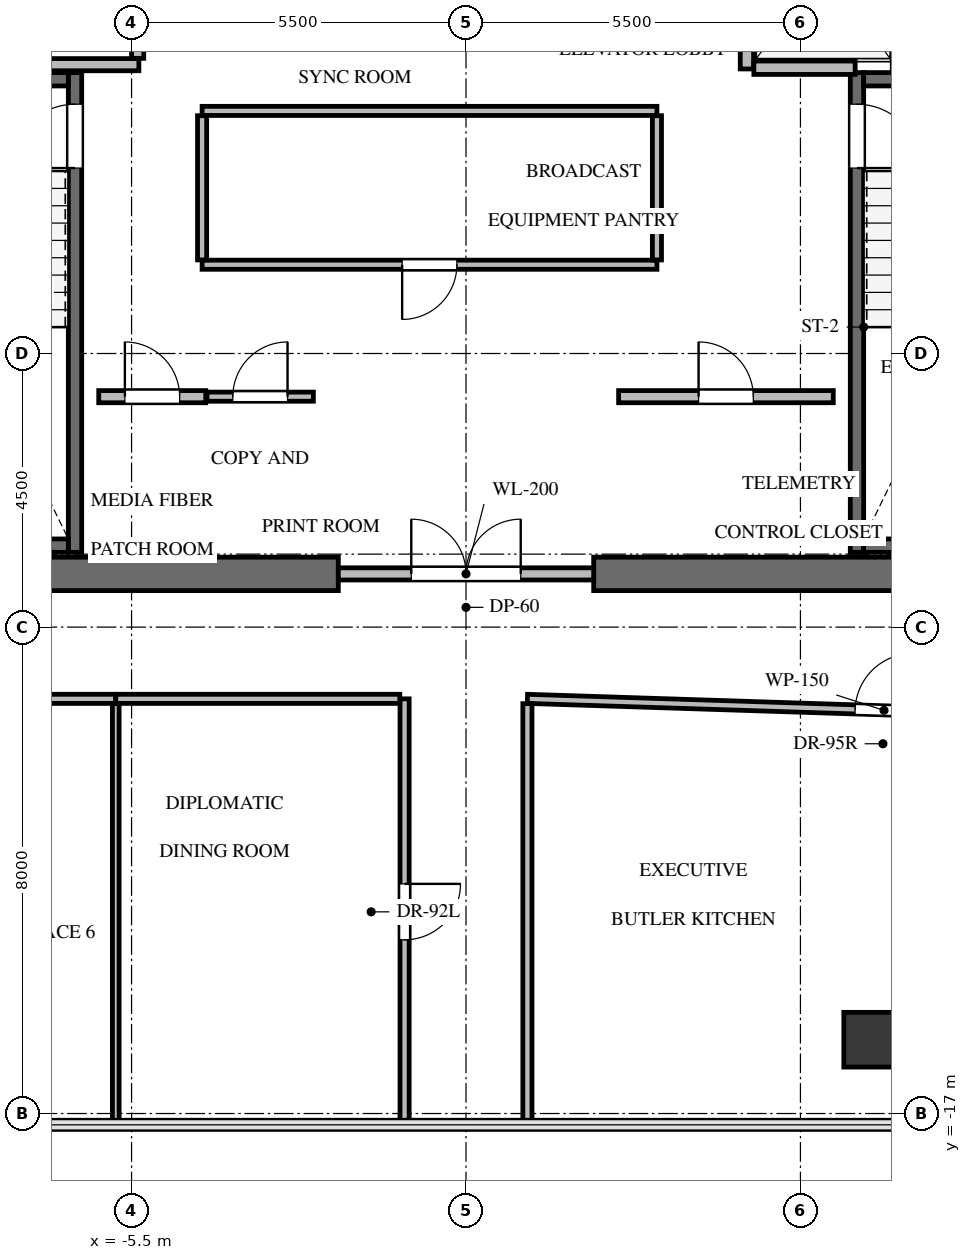
"""IFC4 building model, lengths in metres.
Left out: names, types, materials, properties, quantities, classifications, styles, units other than length and angle.
Written with IfcOpenShell. Run it as: python <this file> out.ifc"""

import sys

from ifc_helpers import new_model, si_unit, direction, frame, frame_2d, origin, origin_2d, place, context, subcontext, project, spatial, rectangle, extrude, source, transform, mapped, element, fill, save


model = new_model("IFC4")
c1 = context("Model", 3, precision=1e-05, world=origin(), true_north=direction((0.0, 1.0)))
c2 = subcontext(c1, "Body", "Model", "MODEL_VIEW")
j1 = project(units=[si_unit("LENGTHUNIT", "METRE"), si_unit("PLANEANGLEUNIT", "RADIAN")], contexts=[c1])
p1 = place(None, origin())
s1 = spatial("IfcSite", under=j1, at=p1, CompositionType="ELEMENT")
p2 = place(p1, origin())
s2 = spatial("IfcBuilding", under=s1, at=p2, CompositionType="ELEMENT")
p3 = place(p2, frame((0.0, 0.0, 261.5)))
s3 = spatial("IfcBuildingStorey", under=s2, at=p3, CompositionType="ELEMENT", Elevation=261.5)
for number, where, z_axis, x_axis in (
    (1, (-9.85, -8.125, 0.0), (0.0, 0.0, 1.0), (1.0, 0.0, 0.0)),
    (2, (2.1, -8.125, 0.0), (0.0, 0.0, 1.0), (1.0, 0.0, 0.0)),
):
    element("IfcWall", number, at=place(p3, frame(where, z_axis=z_axis, x_axis=x_axis)), inside=s3, PredefinedType="SHEAR", context=c2, shape_type="SweptSolid", body=[
        extrude(rectangle(XDim=7.75, YDim=0.55, at=frame_2d((3.875, 0.0))), origin(), (0.0, 0.0, 1.0), 3.4),
    ])
p4 = place(p3, frame((-6.43, -7.77, -0.24), z_axis=(0.0, 0.0, 1.0), x_axis=(0.0, 1.0, 0.0)))
e3 = element("IfcWall", 3, at=p4, inside=s3, PredefinedType="SHEAR", context=c2, shape_type="SweptSolid", body=[
    extrude(rectangle(XDim=7.89, YDim=0.22, at=frame_2d((3.945, 0.0))), origin(), (0.0, 0.0, 1.0), 3.34),
])
p5 = place(p4, frame((6.32, 0.0, 0.0)))
e4 = element("IfcOpeningElement", 4, at=p5, cuts=e3, PredefinedType="OPENING", context=c2, shape_type="SweptSolid", body=[
    extrude(rectangle(XDim=1.05, YDim=2.15, at=frame_2d((0.525, 1.075))), frame((0.0, 0.12, 0.0), z_axis=(0.0, -1.0, 0.0), x_axis=(1.0, 0.0, 0.0)), (0.0, 0.0, 1.0), 0.24),
])
for number, where, z_axis, x_axis in (
    (5, (-9.5, -7.66, -0.24), (0.0, 0.0, 1.0), (1.0, 0.0, 0.0)),
    (6, (-6.54, 0.01, -0.24), (0.0, 0.0, 1.0), (-1.0, 0.0, 0.0)),
):
    element("IfcWall", number, at=place(p3, frame(where, z_axis=z_axis, x_axis=x_axis)), inside=s3, PredefinedType="SHEAR", context=c2, shape_type="SweptSolid", body=[
        extrude(rectangle(XDim=2.96, YDim=0.22, at=frame_2d((1.48, 0.0))), origin(), (0.0, 0.0, 1.0), 3.34),
    ])
p6 = place(p3, frame((6.43, 0.12, -0.24), z_axis=(0.0, 0.0, 1.0), x_axis=(0.0, -1.0, 0.0)))
e7 = element("IfcWall", 7, at=p6, inside=s3, PredefinedType="SHEAR", context=c2, shape_type="SweptSolid", body=[
    extrude(rectangle(XDim=7.89, YDim=0.22, at=frame_2d((3.945, 0.0))), origin(), (0.0, 0.0, 1.0), 3.34),
])
p7 = place(p6, frame((0.52, 0.0, 0.0)))
e8 = element("IfcOpeningElement", 8, at=p7, cuts=e7, PredefinedType="OPENING", context=c2, shape_type="SweptSolid", body=[
    extrude(rectangle(XDim=1.05, YDim=2.15, at=frame_2d((0.525, 1.075))), frame((0.0, 0.12, 0.0), z_axis=(0.0, -1.0, 0.0), x_axis=(1.0, 0.0, 0.0)), (0.0, 0.0, 1.0), 0.24),
])
for number, where, z_axis, x_axis in (
    (9, (6.54, -7.66, -0.24), (0.0, 0.0, 1.0), (1.0, 0.0, 0.0)),
    (10, (9.5, 0.01, -0.24), (0.0, 0.0, 1.0), (-1.0, 0.0, 0.0)),
):
    element("IfcWall", number, at=place(p3, frame(where, z_axis=z_axis, x_axis=x_axis)), inside=s3, PredefinedType="SHEAR", context=c2, shape_type="SweptSolid", body=[
        extrude(rectangle(XDim=2.96, YDim=0.22, at=frame_2d((1.48, 0.0))), origin(), (0.0, 0.0, 1.0), 3.34),
    ])
m1 = source(origin(), c2, "Body", "SweptSolid", [
    extrude(rectangle(XDim=0.9, YDim=0.9, at=origin_2d()), origin(), (0.0, 0.0, 1.0), 3.34),
])
p8 = place(p3, frame((6.664, -15.786, -0.24), z_axis=(0.0, 0.0, 1.0), x_axis=(1.0, 0.0, 0.0)))
e11 = element("IfcColumn", 11, at=p8, inside=s3, PredefinedType="COLUMN", context=c2, shape_type="MappedRepresentation", body=[
    mapped(m1, transform((0.0, 0.0, 0.0), x_axis=(1.0, 0.0, 0.0), y_axis=(0.0, 1.0, 0.0), z_axis=(0.0, 0.0, 1.0), scale=1.0)),
])
p9 = place(p3, frame((-2.1, -8.125, 0.0), z_axis=(0.0, 0.0, 1.0), x_axis=(1.0, 0.0, 0.0)))
e12 = element("IfcWall", 12, at=p9, inside=s3, PredefinedType="SOLIDWALL", context=c2, shape_type="SweptSolid", body=[
    extrude(rectangle(XDim=4.2, YDim=0.2, at=frame_2d((2.1, 0.0))), origin(), (0.0, 0.0, 1.0), 3.085),
])
p10 = place(p9, frame((1.2, 0.0, 0.0)))
e13 = element("IfcOpeningElement", 13, at=p10, cuts=e12, PredefinedType="OPENING", context=c2, shape_type="SweptSolid", body=[
    extrude(rectangle(XDim=1.8, YDim=2.15, at=frame_2d((0.9, 1.075))), frame((0.0, 0.11, 0.0), z_axis=(0.0, -1.0, 0.0), x_axis=(1.0, 0.0, 0.0)), (0.0, 0.0, 1.0), 0.22),
])
p11 = place(p3, frame((-9.65, 0.25, 0.0), z_axis=(0.0, 0.0, 1.0), x_axis=(1.0, 0.0, 0.0)))
e14 = element("IfcWall", 14, at=p11, inside=s3, PredefinedType="SOLIDWALL", context=c2, shape_type="SweptSolid", body=[
    extrude(rectangle(XDim=4.27, YDim=0.2, at=frame_2d((2.135, 0.0))), origin(), (0.0, 0.0, 1.0), 3.085),
])
p12 = place(p3, frame((-5.4, 0.354, 0.0), z_axis=(0.0, 0.0, 1.0), x_axis=(0.0, 1.0, 0.0)))
e15 = element("IfcWall", 15, at=p12, inside=s3, PredefinedType="SOLIDWALL", context=c2, shape_type="SweptSolid", body=[
    extrude(rectangle(XDim=4.026, YDim=0.2, at=frame_2d((2.013, 0.0))), origin(), (0.0, 0.0, 1.0), 3.085),
])
p13 = place(p12, frame((0.246, 0.0, 0.0)))
e16 = element("IfcOpeningElement", 16, at=p13, cuts=e15, PredefinedType="OPENING", context=c2, shape_type="SweptSolid", body=[
    extrude(rectangle(XDim=1.0, YDim=2.15, at=frame_2d((0.5, 1.075))), frame((0.0, 0.11, 0.0), z_axis=(0.0, -1.0, 0.0), x_axis=(1.0, 0.0, 0.0)), (0.0, 0.0, 1.0), 0.22),
])
p14 = place(p3, frame((4.62, 0.18, 0.0), z_axis=(0.0, 0.0, 1.0), x_axis=(0.0, 1.0, 0.0)))
e17 = element("IfcWall", 17, at=p14, inside=s3, PredefinedType="SOLIDWALL", context=c2, shape_type="SweptSolid", body=[
    extrude(rectangle(XDim=3.186, YDim=0.22, at=frame_2d((1.593, 0.0))), origin(), (0.0, 0.0, 1.0), 3.085),
])
p15 = place(p3, frame((4.734, 0.2, 0.0), z_axis=(0.0, 0.0, 1.0), x_axis=(1.0, 0.0, 0.0)))
e18 = element("IfcWall", 18, at=p15, inside=s3, PredefinedType="SOLIDWALL", context=c2, shape_type="SweptSolid", body=[
    extrude(rectangle(XDim=1.666, YDim=0.22, at=frame_2d((0.833, 0.0))), origin(), (0.0, 0.0, 1.0), 3.085),
])
p16 = place(p3, frame((-6.04, -5.21, 0.0), z_axis=(0.0, 0.0, 1.0), x_axis=(1.0, 0.0, 0.0)))
e19 = element("IfcWall", 19, at=p16, inside=s3, PredefinedType="SOLIDWALL", context=c2, shape_type="SweptSolid", body=[
    extrude(rectangle(XDim=1.76, YDim=0.2, at=frame_2d((0.88, 0.0))), origin(), (0.0, 0.0, 1.0), 3.085),
])
p17 = place(p16, frame((0.43, 0.0, 0.0)))
e20 = element("IfcOpeningElement", 20, at=p17, cuts=e19, PredefinedType="OPENING", context=c2, shape_type="SweptSolid", body=[
    extrude(rectangle(XDim=0.9, YDim=2.05, at=frame_2d((0.45, 1.025))), frame((0.0, 0.11, 0.0), z_axis=(0.0, -1.0, 0.0), x_axis=(1.0, 0.0, 0.0)), (0.0, 0.0, 1.0), 0.22),
])
p18 = place(p3, frame((-4.26, -5.21, 0.0), z_axis=(0.0, 0.0, 1.0), x_axis=(1.0, 0.0, 0.0)))
e21 = element("IfcWall", 21, at=p18, inside=s3, PredefinedType="PARTITIONING", context=c2, shape_type="SweptSolid", body=[
    extrude(rectangle(XDim=1.75, YDim=0.15, at=frame_2d((0.875, 0.0))), origin(), (0.0, 0.0, 1.0), 3.085),
])
p19 = place(p18, frame((0.425, 0.0, 0.0)))
e22 = element("IfcOpeningElement", 22, at=p19, cuts=e21, PredefinedType="OPENING", context=c2, shape_type="SweptSolid", body=[
    extrude(rectangle(XDim=0.9, YDim=2.05, at=frame_2d((0.45, 1.025))), frame((0.0, 0.085, 0.0), z_axis=(0.0, -1.0, 0.0), x_axis=(1.0, 0.0, 0.0)), (0.0, 0.0, 1.0), 0.17),
])
p20 = place(p3, frame((2.51, -5.21, 0.0), z_axis=(0.0, 0.0, 1.0), x_axis=(1.0, 0.0, 0.0)))
e23 = element("IfcWall", 23, at=p20, inside=s3, PredefinedType="SOLIDWALL", context=c2, shape_type="SweptSolid", body=[
    extrude(rectangle(XDim=3.53, YDim=0.2, at=frame_2d((1.765, 0.0))), origin(), (0.0, 0.0, 1.0), 3.085),
])
p21 = place(p20, frame((1.315, 0.0, 0.0)))
e24 = element("IfcOpeningElement", 24, at=p21, cuts=e23, PredefinedType="OPENING", context=c2, shape_type="SweptSolid", body=[
    extrude(rectangle(XDim=0.9, YDim=2.05, at=frame_2d((0.45, 1.025))), frame((0.0, 0.11, 0.0), z_axis=(0.0, -1.0, 0.0), x_axis=(1.0, 0.0, 0.0)), (0.0, 0.0, 1.0), 0.22),
])
p22 = place(p3, frame((3.14, -3.04, 0.0), z_axis=(0.0, 0.0, 1.0), x_axis=(-1.0, 0.0, 0.0)))
e25 = element("IfcWall", 25, at=p22, inside=s3, PredefinedType="PARTITIONING", context=c2, shape_type="SweptSolid", body=[
    extrude(rectangle(XDim=7.48, YDim=0.15, at=frame_2d((3.74, 0.0))), origin(), (0.0, 0.0, 1.0), 3.085),
])
p23 = place(p22, frame((3.29, 0.0, 0.0)))
e26 = element("IfcOpeningElement", 26, at=p23, cuts=e25, PredefinedType="OPENING", context=c2, shape_type="SweptSolid", body=[
    extrude(rectangle(XDim=0.9, YDim=2.05, at=frame_2d((0.45, 1.025))), frame((0.0, 0.085, 0.0), z_axis=(0.0, -1.0, 0.0), x_axis=(1.0, 0.0, 0.0)), (0.0, 0.0, 1.0), 0.17),
])
p24 = place(p3, frame((-4.34, -0.51, 0.0), z_axis=(0.0, 0.0, 1.0), x_axis=(1.0, 0.0, 0.0)))
e27 = element("IfcWall", 27, at=p24, inside=s3, PredefinedType="PARTITIONING", context=c2, shape_type="SweptSolid", body=[
    extrude(rectangle(XDim=7.48, YDim=0.15, at=frame_2d((3.74, 0.0))), origin(), (0.0, 0.0, 1.0), 3.085),
])
for number, where, z_axis, x_axis in (
    (28, (-4.34, -2.961, 0.0), (0.0, 0.0, 1.0), (0.0, 1.0, 0.0)),
    (29, (3.14, -0.589, 0.0), (0.0, 0.0, 1.0), (0.0, -1.0, 0.0)),
):
    element("IfcWall", number, at=place(p3, frame(where, z_axis=z_axis, x_axis=x_axis)), inside=s3, PredefinedType="PARTITIONING", context=c2, shape_type="SweptSolid", body=[
        extrude(rectangle(XDim=2.372, YDim=0.15, at=frame_2d((1.186, 0.0))), origin(), (0.0, 0.0, 1.0), 3.085),
    ])
p25 = place(p3, frame((-12.39, -10.18, 0.0), z_axis=(0.0, 0.0, 1.0), x_axis=(1.0, 0.0, 0.0)))
e30 = element("IfcWall", 30, at=p25, inside=s3, PredefinedType="PARTITIONING", context=c2, shape_type="SweptSolid", body=[
    extrude(rectangle(XDim=6.63, YDim=0.15, at=frame_2d((3.315, 0.0))), origin(), (0.0, 0.0, 1.0), 3.085),
])
p26 = place(p25, frame((2.84, 0.0, 0.0)))
e31 = element("IfcOpeningElement", 31, at=p26, cuts=e30, PredefinedType="OPENING", context=c2, shape_type="SweptSolid", body=[
    extrude(rectangle(XDim=0.95, YDim=2.1, at=frame_2d((0.475, 1.05))), frame((0.0, 0.085, 0.0), z_axis=(0.0, -1.0, 0.0), x_axis=(1.0, 0.0, 0.0)), (0.0, 0.0, 1.0), 0.17),
])
p27 = place(p3, frame((-1.01, -10.18, 0.0), z_axis=(0.0, 0.0, 1.0), x_axis=(0.0, -1.0, 0.0)))
e32 = element("IfcWall", 32, at=p27, inside=s3, PredefinedType="PARTITIONING", context=c2, shape_type="SweptSolid", body=[
    extrude(rectangle(XDim=7.006, YDim=0.15, at=frame_2d((3.503, 0.0))), origin(), (0.0, 0.0, 1.0), 2.439),
])
p28 = place(p27, frame((3.043, 0.0, 0.0)))
e33 = element("IfcOpeningElement", 33, at=p28, cuts=e32, PredefinedType="OPENING", context=c2, shape_type="SweptSolid", body=[
    extrude(rectangle(XDim=0.92, YDim=2.1, at=frame_2d((0.46, 1.05))), frame((0.0, 0.085, 0.0), z_axis=(0.0, -1.0, 0.0), x_axis=(1.0, 0.0, 0.0)), (0.0, 0.0, 1.0), 0.17),
])
p29 = place(p3, frame((-5.76, -10.18, 0.0), z_axis=(0.0, 0.0, 1.0), x_axis=(1.0, 0.0, 0.0)))
e34 = element("IfcWall", 34, at=p29, inside=s3, PredefinedType="PARTITIONING", context=c2, shape_type="SweptSolid", body=[
    extrude(rectangle(XDim=4.671, YDim=0.15, at=frame_2d((2.335, 0.0))), origin(), (0.0, 0.0, 1.0), 2.341),
])
p30 = place(p3, frame((1.01, -10.18, 0.0), z_axis=(0.0, 0.0, 1.0), x_axis=(0.999481281494, -0.032205091873, 0.0)))
e35 = element("IfcWall", 35, at=p30, inside=s3, PredefinedType="PARTITIONING", context=c2, shape_type="SweptSolid", body=[
    extrude(rectangle(XDim=11.735, YDim=0.15, at=frame_2d((5.868, 0.0))), origin(), (0.0, 0.0, 1.0), 2.341),
])
p31 = place(p30, frame((5.393, 0.0, 0.0)))
e36 = element("IfcOpeningElement", 36, at=p31, cuts=e35, PredefinedType="OPENING", context=c2, shape_type="SweptSolid", body=[
    extrude(rectangle(XDim=0.95, YDim=2.1, at=frame_2d((0.475, 1.05))), frame((0.0, 0.085, 0.0), z_axis=(0.0, -1.0, 0.0), x_axis=(1.0, 0.0, 0.0)), (0.0, 0.0, 1.0), 0.17),
])
p32 = place(p3, frame((1.01, -17.186, 0.0), z_axis=(0.0, 0.0, 1.0), x_axis=(0.0, 1.0, 0.0)))
e37 = element("IfcWall", 37, at=p32, inside=s3, PredefinedType="PARTITIONING", context=c2, shape_type="SweptSolid", body=[
    extrude(rectangle(XDim=6.927, YDim=0.15, at=frame_2d((3.463, 0.0))), origin(), (0.0, 0.0, 1.0), 2.439),
])
p33 = place(p3, frame((-5.76, -10.259, 0.0), z_axis=(0.0, 0.0, 1.0), x_axis=(0.0, -1.0, 0.0)))
e38 = element("IfcWall", 38, at=p33, inside=s3, PredefinedType="MOVABLE", context=c2, shape_type="SweptSolid", body=[
    extrude(rectangle(XDim=6.927, YDim=0.11, at=frame_2d((3.463, 0.0))), origin(), (0.0, 0.0, 1.0), 2.341),
])
m2 = source(origin(), c2, "Body", "SweptSolid", [
    extrude(rectangle(XDim=1.05, YDim=2.15, at=frame_2d((0.525, 1.075))), frame((0.0, 0.025, 0.0), z_axis=(0.0, -1.0, 0.0), x_axis=(1.0, 0.0, 0.0)), (0.0, 0.0, 1.0), 0.05),
])
p34 = place(p5, origin())
e39 = element("IfcDoor", 39, at=p34, inside=s3, OperationType="SINGLE_SWING_LEFT", PredefinedType="DOOR", context=c2, shape_type="MappedRepresentation", body=[
    mapped(m2, transform((0.0, 0.0, 0.0), x_axis=(1.0, 0.0, 0.0), y_axis=(0.0, 1.0, 0.0), z_axis=(0.0, 0.0, 1.0), scale=1.0)),
])
fill(e4, e39)
m3 = source(origin(), c2, "Body", "SweptSolid", [
    extrude(rectangle(XDim=1.05, YDim=2.15, at=frame_2d((0.525, 1.075))), frame((0.0, 0.025, 0.0), z_axis=(0.0, -1.0, 0.0), x_axis=(1.0, 0.0, 0.0)), (0.0, 0.0, 1.0), 0.05),
])
p35 = place(p7, origin())
e40 = element("IfcDoor", 40, at=p35, inside=s3, OperationType="SINGLE_SWING_RIGHT", PredefinedType="DOOR", context=c2, shape_type="MappedRepresentation", body=[
    mapped(m3, transform((0.0, 0.0, 0.0), x_axis=(1.0, 0.0, 0.0), y_axis=(0.0, 1.0, 0.0), z_axis=(0.0, 0.0, 1.0), scale=1.0)),
])
fill(e8, e40)
m4 = source(origin(), c2, "Body", "SweptSolid", [
    extrude(rectangle(XDim=1.8, YDim=2.15, at=frame_2d((0.9, 1.075))), frame((0.0, 0.025, 0.0), z_axis=(0.0, -1.0, 0.0), x_axis=(1.0, 0.0, 0.0)), (0.0, 0.0, 1.0), 0.05),
])
p36 = place(p10, origin())
e41 = element("IfcDoor", 41, at=p36, inside=s3, OperationType="DOUBLE_DOOR_SINGLE_SWING", PredefinedType="DOOR", context=c2, shape_type="MappedRepresentation", body=[
    mapped(m4, transform((0.0, 0.0, 0.0), x_axis=(1.0, 0.0, 0.0), y_axis=(0.0, 1.0, 0.0), z_axis=(0.0, 0.0, 1.0), scale=1.0)),
])
fill(e13, e41)
m5 = source(origin(), c2, "Body", "SweptSolid", [
    extrude(rectangle(XDim=0.9, YDim=2.05, at=frame_2d((0.45, 1.025))), frame((0.0, 0.025, 0.0), z_axis=(0.0, -1.0, 0.0), x_axis=(1.0, 0.0, 0.0)), (0.0, 0.0, 1.0), 0.05),
])
p37 = place(p17, origin())
e42 = element("IfcDoor", 42, at=p37, inside=s3, OperationType="SINGLE_SWING_LEFT", PredefinedType="DOOR", context=c2, shape_type="MappedRepresentation", body=[
    mapped(m5, transform((0.0, 0.0, 0.0), x_axis=(1.0, 0.0, 0.0), y_axis=(0.0, 1.0, 0.0), z_axis=(0.0, 0.0, 1.0), scale=1.0)),
])
fill(e20, e42)
m6 = source(origin(), c2, "Body", "SweptSolid", [
    extrude(rectangle(XDim=0.9, YDim=2.05, at=frame_2d((0.45, 1.025))), frame((0.0, 0.025, 0.0), z_axis=(0.0, -1.0, 0.0), x_axis=(1.0, 0.0, 0.0)), (0.0, 0.0, 1.0), 0.05),
])
p38 = place(p19, origin())
e43 = element("IfcDoor", 43, at=p38, inside=s3, OperationType="SINGLE_SWING_RIGHT", PredefinedType="DOOR", context=c2, shape_type="MappedRepresentation", body=[
    mapped(m6, transform((0.0, 0.0, 0.0), x_axis=(1.0, 0.0, 0.0), y_axis=(0.0, 1.0, 0.0), z_axis=(0.0, 0.0, 1.0), scale=1.0)),
])
fill(e22, e43)
p39 = place(p21, origin())
e44 = element("IfcDoor", 44, at=p39, inside=s3, OperationType="SINGLE_SWING_LEFT", PredefinedType="DOOR", context=c2, shape_type="MappedRepresentation", body=[
    mapped(m5, transform((0.0, 0.0, 0.0), x_axis=(1.0, 0.0, 0.0), y_axis=(0.0, 1.0, 0.0), z_axis=(0.0, 0.0, 1.0), scale=1.0)),
])
fill(e24, e44)
p40 = place(p23, origin())
e45 = element("IfcDoor", 45, at=p40, inside=s3, OperationType="SINGLE_SWING_RIGHT", PredefinedType="DOOR", context=c2, shape_type="MappedRepresentation", body=[
    mapped(m6, transform((0.0, 0.0, 0.0), x_axis=(1.0, 0.0, 0.0), y_axis=(0.0, 1.0, 0.0), z_axis=(0.0, 0.0, 1.0), scale=1.0)),
])
fill(e26, e45)
m7 = source(origin(), c2, "Body", "SweptSolid", [
    extrude(rectangle(XDim=0.92, YDim=2.1, at=frame_2d((0.46, 1.05))), frame((0.0, 0.025, 0.0), z_axis=(0.0, -1.0, 0.0), x_axis=(1.0, 0.0, 0.0)), (0.0, 0.0, 1.0), 0.05),
])
p41 = place(p28, origin())
e46 = element("IfcDoor", 46, at=p41, inside=s3, OperationType="SINGLE_SWING_LEFT", PredefinedType="DOOR", context=c2, shape_type="MappedRepresentation", body=[
    mapped(m7, transform((0.0, 0.0, 0.0), x_axis=(1.0, 0.0, 0.0), y_axis=(0.0, 1.0, 0.0), z_axis=(0.0, 0.0, 1.0), scale=1.0)),
])
fill(e33, e46)
m8 = source(origin(), c2, "Body", "SweptSolid", [
    extrude(rectangle(XDim=0.95, YDim=2.1, at=frame_2d((0.475, 1.05))), frame((0.0, 0.025, 0.0), z_axis=(0.0, -1.0, 0.0), x_axis=(1.0, 0.0, 0.0)), (0.0, 0.0, 1.0), 0.05),
])
p42 = place(p31, origin())
e47 = element("IfcDoor", 47, at=p42, inside=s3, OperationType="SINGLE_SWING_RIGHT", PredefinedType="DOOR", context=c2, shape_type="MappedRepresentation", body=[
    mapped(m8, transform((0.0, 0.0, 0.0), x_axis=(1.0, 0.0, 0.0), y_axis=(0.0, 1.0, 0.0), z_axis=(0.0, 0.0, 1.0), scale=1.0)),
])
fill(e36, e47)
save(model, sys.argv[1])
